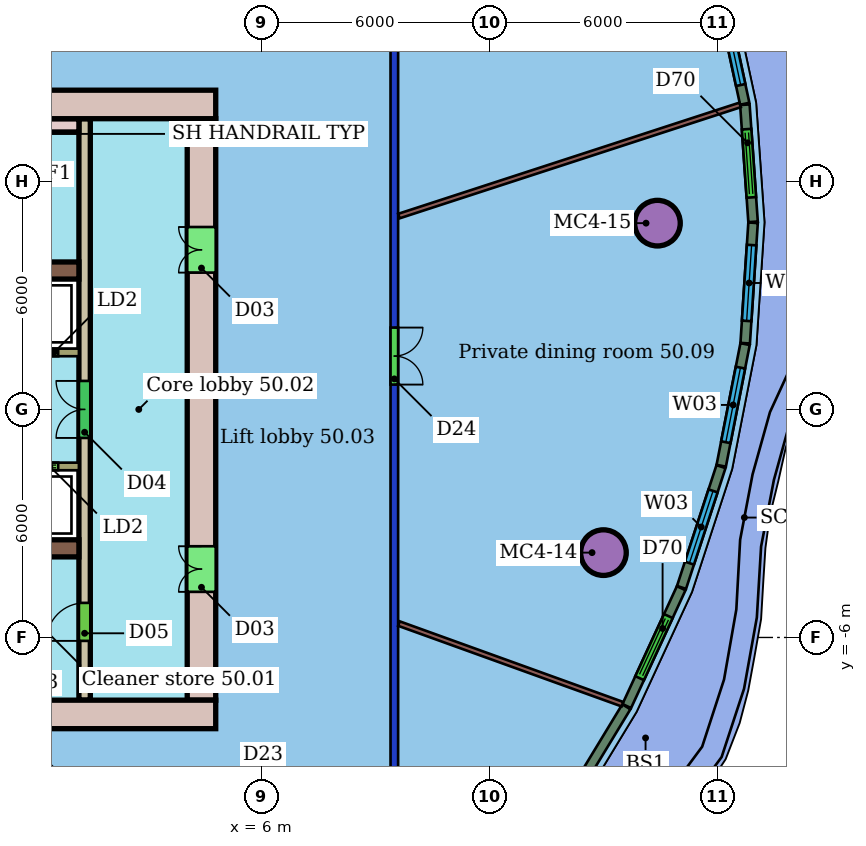
"""IFC4 building model, lengths in metres.
Left out: names, types, materials, properties, quantities, classifications, styles, units other than length and angle.
Written with IfcOpenShell. Run it as: python <this file> out.ifc"""

import sys

from ifc_helpers import new_model, si_unit, direction, frame, frame_2d, origin, origin_2d, place, context, subcontext, project, spatial, rectangle, hollow_circle, extrude, element, fill, save


model = new_model("IFC4")
c1 = context("Model", 3, precision=1e-05, world=origin(), true_north=direction((0.0, 1.0)))
c2 = subcontext(c1, "Body", "Model", "MODEL_VIEW")
j1 = project(units=[si_unit("LENGTHUNIT", "METRE"), si_unit("PLANEANGLEUNIT", "RADIAN")], contexts=[c1])
p1 = place(None, origin())
s1 = spatial("IfcSite", under=j1, at=p1, CompositionType="ELEMENT")
p2 = place(p1, origin())
s2 = spatial("IfcBuilding", under=s1, at=p2, CompositionType="ELEMENT")
p3 = place(p2, frame((0.0, 0.0, 206.5)))
s3 = spatial("IfcBuildingStorey", under=s2, at=p3, CompositionType="ELEMENT", Elevation=206.5)
for number, where, z_axis, x_axis in (
    (1, (15.003, -3.768, 0.0), (0.0, 0.0, 1.0), (1.0, 0.0, 0.0)),
    (2, (16.424, 4.901, 0.0), (0.0, 0.0, 1.0), (1.0, 0.0, 0.0)),
):
    element("IfcColumn", number, at=place(p3, frame(where, z_axis=z_axis, x_axis=x_axis)), inside=s3, PredefinedType="COLUMN", context=c2, shape_type="SweptSolid", body=[
        extrude(hollow_circle(Radius=0.6, WallThickness=0.045, at=origin_2d()), origin(), (0.0, 0.0, 1.0), 3.45),
    ])
p4 = place(p3, frame((9.5, 10.4, 0.0), z_axis=(0.0, 0.0, 1.0), x_axis=(0.0, -1.0, 0.0)))
e3 = element("IfcWall", 3, at=p4, inside=s3, PredefinedType="PARTITIONING", context=c2, shape_type="SweptSolid", body=[
    extrude(rectangle(XDim=20.8, YDim=0.2, at=frame_2d((10.4, 0.0))), origin(), (0.0, 0.0, 1.0), 3.05),
])
p5 = place(p4, frame((8.246, 0.0, 0.0)))
e4 = element("IfcOpeningElement", 4, at=p5, cuts=e3, PredefinedType="OPENING", context=c2, shape_type="SweptSolid", body=[
    extrude(rectangle(XDim=1.5, YDim=2.1, at=frame_2d((0.75, 1.05))), frame((0.0, 0.11, 0.0), z_axis=(0.0, -1.0, 0.0), x_axis=(1.0, 0.0, 0.0)), (0.0, 0.0, 1.0), 0.22),
])
p6 = place(p3, frame((15.501, -7.756, 0.0), z_axis=(0.0, 0.0, 1.0), x_axis=(-0.940683105583, 0.339286449583, 0.0)))
e5 = element("IfcWall", 5, at=p6, inside=s3, PredefinedType="PARTITIONING", context=c2, shape_type="SweptSolid", body=[
    extrude(rectangle(XDim=6.251, YDim=0.125, at=frame_2d((3.125, 0.0))), origin(), (0.0, 0.0, 1.0), 3.45),
])
p7 = place(p3, frame((18.599, 8.013, 0.0), z_axis=(0.0, 0.0, 1.0), x_axis=(-0.950829834715, -0.30971377983, 0.0)))
e6 = element("IfcWall", 6, at=p7, inside=s3, PredefinedType="PARTITIONING", context=c2, shape_type="SweptSolid", body=[
    extrude(rectangle(XDim=9.444, YDim=0.125, at=frame_2d((4.722, 0.0))), origin(), (0.0, 0.0, 1.0), 3.45),
])
p8 = place(p3, frame((13.827, -10.755, 0.0), z_axis=(0.0, 0.0, 1.0), x_axis=(0.518887081606, 0.854842790542, 0.0)))
e7 = element("IfcWall", 7, at=p8, inside=s3, PredefinedType="SOLIDWALL", context=c2, shape_type="SweptSolid", body=[
    extrude(rectangle(XDim=3.429, YDim=0.25, at=frame_2d((1.714, 0.0))), origin(), (0.0, 0.0, 1.0), 3.1),
])
p9 = place(p3, frame((15.616, -7.804, 0.0), z_axis=(0.0, 0.0, 1.0), x_axis=(0.419438897157, 0.907783570876, 0.0)))
e8 = element("IfcWall", 8, at=p9, inside=s3, PredefinedType="SOLIDWALL", context=c2, shape_type="SweptSolid", body=[
    extrude(rectangle(XDim=3.416, YDim=0.25, at=frame_2d((1.708, 0.0))), origin(), (0.0, 0.0, 1.0), 3.1),
])
p10 = place(p9, frame((0.808, 0.0, 0.0)))
e9 = element("IfcOpeningElement", 9, at=p10, cuts=e8, PredefinedType="OPENING", context=c2, shape_type="SweptSolid", body=[
    extrude(rectangle(XDim=1.8, YDim=2.4, at=frame_2d((0.9, 1.2))), frame((0.0, 0.135, 0.0), z_axis=(0.0, -1.0, 0.0), x_axis=(1.0, 0.0, 0.0)), (0.0, 0.0, 1.0), 0.27),
])
p11 = place(p3, frame((17.057, -4.683, 0.0), z_axis=(0.0, 0.0, 1.0), x_axis=(0.310658941467, 0.950521447463, 0.0)))
e10 = element("IfcWall", 10, at=p11, inside=s3, PredefinedType="SOLIDWALL", context=c2, shape_type="SweptSolid", body=[
    extrude(rectangle(XDim=3.344, YDim=0.25, at=frame_2d((1.672, 0.0))), origin(), (0.0, 0.0, 1.0), 3.1),
])
p12 = place(p11, frame((0.672, 0.0, 0.9)))
e11 = element("IfcOpeningElement", 11, at=p12, cuts=e10, PredefinedType="OPENING", context=c2, shape_type="SweptSolid", body=[
    extrude(rectangle(XDim=2.0, YDim=2.1, at=frame_2d((1.0, 1.05))), frame((0.0, 0.135, 0.0), z_axis=(0.0, -1.0, 0.0), x_axis=(1.0, 0.0, 0.0)), (0.0, 0.0, 1.0), 0.27),
])
p13 = place(p3, frame((18.102, -1.482, 0.0), z_axis=(0.0, 0.0, 1.0), x_axis=(0.192487942272, 0.981299338673, 0.0)))
e12 = element("IfcWall", 12, at=p13, inside=s3, PredefinedType="SOLIDWALL", context=c2, shape_type="SweptSolid", body=[
    extrude(rectangle(XDim=3.262, YDim=0.25, at=frame_2d((1.631, 0.0))), origin(), (0.0, 0.0, 1.0), 3.1),
])
p14 = place(p13, frame((0.631, 0.0, 0.9)))
e13 = element("IfcOpeningElement", 13, at=p14, cuts=e12, PredefinedType="OPENING", context=c2, shape_type="SweptSolid", body=[
    extrude(rectangle(XDim=2.0, YDim=2.1, at=frame_2d((1.0, 1.05))), frame((0.0, 0.135, 0.0), z_axis=(0.0, -1.0, 0.0), x_axis=(1.0, 0.0, 0.0)), (0.0, 0.0, 1.0), 0.27),
])
p15 = place(p3, frame((18.733, 1.743, 0.0), z_axis=(0.0, 0.0, 1.0), x_axis=(0.065278866851, 0.997867060055, 0.0)))
e14 = element("IfcWall", 14, at=p15, inside=s3, PredefinedType="SOLIDWALL", context=c2, shape_type="SweptSolid", body=[
    extrude(rectangle(XDim=3.175, YDim=0.25, at=frame_2d((1.588, 0.0))), origin(), (0.0, 0.0, 1.0), 3.1),
])
p16 = place(p15, frame((0.588, 0.0, 0.9)))
e15 = element("IfcOpeningElement", 15, at=p16, cuts=e14, PredefinedType="OPENING", context=c2, shape_type="SweptSolid", body=[
    extrude(rectangle(XDim=2.0, YDim=2.1, at=frame_2d((1.0, 1.05))), frame((0.0, 0.135, 0.0), z_axis=(0.0, -1.0, 0.0), x_axis=(1.0, 0.0, 0.0)), (0.0, 0.0, 1.0), 0.27),
])
p17 = place(p3, frame((18.94, 4.936, 0.0), z_axis=(0.0, 0.0, 1.0), x_axis=(-0.06987632373, 0.997555662298, 0.0)))
e16 = element("IfcWall", 16, at=p17, inside=s3, PredefinedType="SOLIDWALL", context=c2, shape_type="SweptSolid", body=[
    extrude(rectangle(XDim=3.089, YDim=0.25, at=frame_2d((1.544, 0.0))), origin(), (0.0, 0.0, 1.0), 3.1),
])
p18 = place(p17, frame((0.644, 0.0, 0.0)))
e17 = element("IfcOpeningElement", 17, at=p18, cuts=e16, PredefinedType="OPENING", context=c2, shape_type="SweptSolid", body=[
    extrude(rectangle(XDim=1.8, YDim=2.4, at=frame_2d((0.9, 1.2))), frame((0.0, 0.135, 0.0), z_axis=(0.0, -1.0, 0.0), x_axis=(1.0, 0.0, 0.0)), (0.0, 0.0, 1.0), 0.27),
])
p19 = place(p3, frame((18.72, 8.043, 0.0), z_axis=(0.0, 0.0, 1.0), x_axis=(-0.210637196003, 0.977564305639, 0.0)))
e18 = element("IfcWall", 18, at=p19, inside=s3, PredefinedType="SOLIDWALL", context=c2, shape_type="SweptSolid", body=[
    extrude(rectangle(XDim=3.009, YDim=0.25, at=frame_2d((1.504, 0.0))), origin(), (0.0, 0.0, 1.0), 3.1),
])
p20 = place(p19, frame((0.504, 0.0, 0.9)))
e19 = element("IfcOpeningElement", 19, at=p20, cuts=e18, PredefinedType="OPENING", context=c2, shape_type="SweptSolid", body=[
    extrude(rectangle(XDim=2.0, YDim=2.1, at=frame_2d((1.0, 1.05))), frame((0.0, 0.135, 0.0), z_axis=(0.0, -1.0, 0.0), x_axis=(1.0, 0.0, 0.0)), (0.0, 0.0, 1.0), 0.27),
])
p21 = place(p3, frame((4.8, 8.025, 0.0), z_axis=(0.0, 0.0, 1.0), x_axis=(-1.0, 0.0, 0.0)))
e20 = element("IfcWall", 20, at=p21, inside=s3, PredefinedType="SHEAR", context=c2, shape_type="SweptSolid", body=[
    extrude(rectangle(XDim=10.8, YDim=0.75, at=frame_2d((5.4, 0.0))), origin(), (0.0, 0.0, 1.0), 3.3),
])
p22 = place(p21, frame((4.4, 0.0, 0.0)))
e21 = element("IfcOpeningElement", 21, at=p22, cuts=e20, PredefinedType="OPENING", context=c2, shape_type="SweptSolid", body=[
    extrude(rectangle(XDim=1.2, YDim=2.1, at=frame_2d((0.6, 1.05))), frame((0.0, 0.385, 0.0), z_axis=(0.0, -1.0, 0.0), x_axis=(1.0, 0.0, 0.0)), (0.0, 0.0, 1.0), 0.77),
])
p23 = place(p3, frame((-16.8, -8.025, 0.0), z_axis=(0.0, 0.0, 1.0), x_axis=(1.0, 0.0, 0.0)))
e22 = element("IfcWall", 22, at=p23, inside=s3, PredefinedType="SHEAR", context=c2, shape_type="SweptSolid", body=[
    extrude(rectangle(XDim=21.6, YDim=0.75, at=frame_2d((10.8, 0.0))), origin(), (0.0, 0.0, 1.0), 3.3),
])
p24 = place(p23, frame((4.8, 0.0, 0.0)))
e23 = element("IfcOpeningElement", 23, at=p24, cuts=e22, PredefinedType="OPENING", context=c2, shape_type="SweptSolid", body=[
    extrude(rectangle(XDim=1.2, YDim=2.1, at=frame_2d((0.6, 1.05))), frame((0.0, 0.385, 0.0), z_axis=(0.0, -1.0, 0.0), x_axis=(1.0, 0.0, 0.0)), (0.0, 0.0, 1.0), 0.77),
])
p25 = place(p3, frame((4.425, -7.65, 0.0), z_axis=(0.0, 0.0, 1.0), x_axis=(0.0, 1.0, 0.0)))
e24 = element("IfcWall", 24, at=p25, inside=s3, PredefinedType="SHEAR", context=c2, shape_type="SweptSolid", body=[
    extrude(rectangle(XDim=15.3, YDim=0.75, at=frame_2d((7.65, 0.0))), origin(), (0.0, 0.0, 1.0), 3.3),
])
p26 = place(p25, frame((2.85, 0.0, 0.0)))
e25 = element("IfcOpeningElement", 25, at=p26, cuts=e24, PredefinedType="OPENING", context=c2, shape_type="SweptSolid", body=[
    extrude(rectangle(XDim=1.2, YDim=2.1, at=frame_2d((0.6, 1.05))), frame((0.0, 0.385, 0.0), z_axis=(0.0, -1.0, 0.0), x_axis=(1.0, 0.0, 0.0)), (0.0, 0.0, 1.0), 0.77),
])
p27 = place(p25, frame((11.25, 0.0, 0.0)))
e26 = element("IfcOpeningElement", 26, at=p27, cuts=e24, PredefinedType="OPENING", context=c2, shape_type="SweptSolid", body=[
    extrude(rectangle(XDim=1.2, YDim=2.1, at=frame_2d((0.6, 1.05))), frame((0.0, 0.385, 0.0), z_axis=(0.0, -1.0, 0.0), x_axis=(1.0, 0.0, 0.0)), (0.0, 0.0, 1.0), 0.77),
])
for number, where, z_axis, x_axis in (
    (27, (-6.0, 3.655, 0.0), (0.0, 0.0, 1.0), (1.0, 0.0, 0.0)),
    (28, (-6.0, -3.655, 0.0), (0.0, 0.0, 1.0), (1.0, 0.0, 0.0)),
):
    element("IfcWall", number, at=place(p3, frame(where, z_axis=z_axis, x_axis=x_axis)), inside=s3, PredefinedType="SHEAR", context=c2, shape_type="SweptSolid", body=[
        extrude(rectangle(XDim=7.2, YDim=0.45, at=frame_2d((3.6, 0.0))), origin(), (0.0, 0.0, 1.0), 3.3),
    ])
p28 = place(p3, frame((1.35, -7.65, 0.0), z_axis=(0.0, 0.0, 1.0), x_axis=(0.0, 1.0, 0.0)))
e29 = element("IfcWall", 29, at=p28, inside=s3, PredefinedType="SHEAR", context=c2, shape_type="SweptSolid", body=[
    extrude(rectangle(XDim=15.3, YDim=0.3, at=frame_2d((7.65, 0.0))), origin(), (0.0, 0.0, 1.0), 3.3),
])
p29 = place(p28, frame((1.56, 0.0, 0.0)))
e30 = element("IfcOpeningElement", 30, at=p29, cuts=e29, PredefinedType="OPENING", context=c2, shape_type="SweptSolid", body=[
    extrude(rectangle(XDim=1.0, YDim=2.1, at=frame_2d((0.5, 1.05))), frame((0.0, 0.16, 0.0), z_axis=(0.0, -1.0, 0.0), x_axis=(1.0, 0.0, 0.0)), (0.0, 0.0, 1.0), 0.32),
])
p30 = place(p28, frame((6.9, 0.0, 0.0)))
e31 = element("IfcOpeningElement", 31, at=p30, cuts=e29, PredefinedType="OPENING", context=c2, shape_type="SweptSolid", body=[
    extrude(rectangle(XDim=1.5, YDim=2.1, at=frame_2d((0.75, 1.05))), frame((0.0, 0.16, 0.0), z_axis=(0.0, -1.0, 0.0), x_axis=(1.0, 0.0, 0.0)), (0.0, 0.0, 1.0), 0.32),
])
p31 = place(p3, frame((-13.2, 1.5, 0.0), z_axis=(0.0, 0.0, 1.0), x_axis=(1.0, 0.0, 0.0)))
e32 = element("IfcWall", 32, at=p31, inside=s3, PredefinedType="SHEAR", context=c2, shape_type="SweptSolid", body=[
    extrude(rectangle(XDim=14.4, YDim=0.2, at=frame_2d((7.2, 0.0))), origin(), (0.0, 0.0, 1.0), 3.3),
])
p32 = place(p31, frame((10.312, 0.0, 0.0)))
e33 = element("IfcOpeningElement", 33, at=p32, cuts=e32, PredefinedType="OPENING", context=c2, shape_type="SweptSolid", body=[
    extrude(rectangle(XDim=1.1, YDim=2.1, at=frame_2d((0.55, 1.05))), frame((0.0, 0.11, 0.0), z_axis=(0.0, -1.0, 0.0), x_axis=(1.0, 0.0, 0.0)), (0.0, 0.0, 1.0), 0.22),
])
p33 = place(p31, frame((12.754, 0.0, 0.0)))
e34 = element("IfcOpeningElement", 34, at=p33, cuts=e32, PredefinedType="OPENING", context=c2, shape_type="SweptSolid", body=[
    extrude(rectangle(XDim=1.1, YDim=2.1, at=frame_2d((0.55, 1.05))), frame((0.0, 0.11, 0.0), z_axis=(0.0, -1.0, 0.0), x_axis=(1.0, 0.0, 0.0)), (0.0, 0.0, 1.0), 0.22),
])
p34 = place(p31, frame((0.15, 0.0, 0.0)))
e35 = element("IfcOpeningElement", 35, at=p34, cuts=e32, PredefinedType="OPENING", context=c2, shape_type="SweptSolid", body=[
    extrude(rectangle(XDim=0.9, YDim=2.1, at=frame_2d((0.45, 1.05))), frame((0.0, 0.11, 0.0), z_axis=(0.0, -1.0, 0.0), x_axis=(1.0, 0.0, 0.0)), (0.0, 0.0, 1.0), 0.22),
])
p35 = place(p31, frame((4.983, 0.0, 0.0)))
e36 = element("IfcOpeningElement", 36, at=p35, cuts=e32, PredefinedType="OPENING", context=c2, shape_type="SweptSolid", body=[
    extrude(rectangle(XDim=0.9, YDim=2.1, at=frame_2d((0.45, 1.05))), frame((0.0, 0.11, 0.0), z_axis=(0.0, -1.0, 0.0), x_axis=(1.0, 0.0, 0.0)), (0.0, 0.0, 1.0), 0.22),
])
p36 = place(p3, frame((1.2, -1.5, 0.0), z_axis=(0.0, 0.0, 1.0), x_axis=(-1.0, 0.0, 0.0)))
e37 = element("IfcWall", 37, at=p36, inside=s3, PredefinedType="SHEAR", context=c2, shape_type="SweptSolid", body=[
    extrude(rectangle(XDim=14.4, YDim=0.2, at=frame_2d((7.2, 0.0))), origin(), (0.0, 0.0, 1.0), 3.3),
])
p37 = place(p36, frame((7.821, 0.0, 0.0)))
e38 = element("IfcOpeningElement", 38, at=p37, cuts=e37, PredefinedType="OPENING", context=c2, shape_type="SweptSolid", body=[
    extrude(rectangle(XDim=1.2, YDim=2.1, at=frame_2d((0.6, 1.05))), frame((0.0, 0.11, 0.0), z_axis=(0.0, -1.0, 0.0), x_axis=(1.0, 0.0, 0.0)), (0.0, 0.0, 1.0), 0.22),
])
p38 = place(p36, frame((0.546, 0.0, 0.0)))
e39 = element("IfcOpeningElement", 39, at=p38, cuts=e37, PredefinedType="OPENING", context=c2, shape_type="SweptSolid", body=[
    extrude(rectangle(XDim=1.1, YDim=2.1, at=frame_2d((0.55, 1.05))), frame((0.0, 0.11, 0.0), z_axis=(0.0, -1.0, 0.0), x_axis=(1.0, 0.0, 0.0)), (0.0, 0.0, 1.0), 0.22),
])
p39 = place(p36, frame((4.983, 0.0, 0.0)))
e40 = element("IfcOpeningElement", 40, at=p39, cuts=e37, PredefinedType="OPENING", context=c2, shape_type="SweptSolid", body=[
    extrude(rectangle(XDim=1.0, YDim=2.1, at=frame_2d((0.5, 1.05))), frame((0.0, 0.11, 0.0), z_axis=(0.0, -1.0, 0.0), x_axis=(1.0, 0.0, 0.0)), (0.0, 0.0, 1.0), 0.22),
])
p40 = place(p36, frame((2.592, 0.0, 0.0)))
e41 = element("IfcOpeningElement", 41, at=p40, cuts=e37, PredefinedType="OPENING", context=c2, shape_type="SweptSolid", body=[
    extrude(rectangle(XDim=1.0, YDim=2.1, at=frame_2d((0.5, 1.05))), frame((0.0, 0.11, 0.0), z_axis=(0.0, -1.0, 0.0), x_axis=(1.0, 0.0, 0.0)), (0.0, 0.0, 1.0), 0.22),
])
p41 = place(p3, frame((0.4, 7.475, 0.0), z_axis=(0.0, 0.0, 1.0), x_axis=(1.0, 0.0, 0.0)))
e42 = element("IfcWall", 42, at=p41, inside=s3, PredefinedType="SHEAR", context=c2, shape_type="SweptSolid", body=[
    extrude(rectangle(XDim=0.8, YDim=0.35, at=frame_2d((0.4, 0.0))), origin(), (0.0, 0.0, 1.0), 3.3),
])
p42 = place(p5, origin())
e43 = element("IfcDoor", 43, at=p42, inside=s3, OperationType="DOUBLE_DOOR_SINGLE_SWING", PredefinedType="DOOR", context=c2, shape_type="SweptSolid", body=[
    extrude(rectangle(XDim=1.5, YDim=2.1, at=frame_2d((0.75, 1.05))), frame((0.0, 0.025, 0.0), z_axis=(0.0, -1.0, 0.0), x_axis=(1.0, 0.0, 0.0)), (0.0, 0.0, 1.0), 0.05),
])
fill(e4, e43)
p43 = place(p10, origin())
e44 = element("IfcDoor", 44, at=p43, inside=s3, OperationType="DOUBLE_DOOR_SLIDING", PredefinedType="DOOR", context=c2, shape_type="SweptSolid", body=[
    extrude(rectangle(XDim=1.8, YDim=2.4, at=frame_2d((0.9, 1.2))), frame((0.0, 0.025, 0.0), z_axis=(0.0, -1.0, 0.0), x_axis=(1.0, 0.0, 0.0)), (0.0, 0.0, 1.0), 0.05),
])
fill(e9, e44)
p44 = place(p12, origin())
e45 = element("IfcWindow", 45, at=p44, inside=s3, PartitioningType="SINGLE_PANEL", PredefinedType="WINDOW", context=c2, shape_type="SweptSolid", body=[
    extrude(rectangle(XDim=2.0, YDim=2.1, at=frame_2d((1.0, 1.05))), frame((0.0, 0.03, 0.0), z_axis=(0.0, -1.0, 0.0), x_axis=(1.0, 0.0, 0.0)), (0.0, 0.0, 1.0), 0.06),
])
fill(e11, e45)
p45 = place(p14, origin())
e46 = element("IfcWindow", 46, at=p45, inside=s3, PartitioningType="SINGLE_PANEL", PredefinedType="WINDOW", context=c2, shape_type="SweptSolid", body=[
    extrude(rectangle(XDim=2.0, YDim=2.1, at=frame_2d((1.0, 1.05))), frame((0.0, 0.03, 0.0), z_axis=(0.0, -1.0, 0.0), x_axis=(1.0, 0.0, 0.0)), (0.0, 0.0, 1.0), 0.06),
])
fill(e13, e46)
p46 = place(p16, origin())
e47 = element("IfcWindow", 47, at=p46, inside=s3, PartitioningType="SINGLE_PANEL", PredefinedType="WINDOW", context=c2, shape_type="SweptSolid", body=[
    extrude(rectangle(XDim=2.0, YDim=2.1, at=frame_2d((1.0, 1.05))), frame((0.0, 0.03, 0.0), z_axis=(0.0, -1.0, 0.0), x_axis=(1.0, 0.0, 0.0)), (0.0, 0.0, 1.0), 0.06),
])
fill(e15, e47)
p47 = place(p18, origin())
e48 = element("IfcDoor", 48, at=p47, inside=s3, OperationType="DOUBLE_DOOR_SLIDING", PredefinedType="DOOR", context=c2, shape_type="SweptSolid", body=[
    extrude(rectangle(XDim=1.8, YDim=2.4, at=frame_2d((0.9, 1.2))), frame((0.0, 0.025, 0.0), z_axis=(0.0, -1.0, 0.0), x_axis=(1.0, 0.0, 0.0)), (0.0, 0.0, 1.0), 0.05),
])
fill(e17, e48)
p48 = place(p20, origin())
e49 = element("IfcWindow", 49, at=p48, inside=s3, PartitioningType="SINGLE_PANEL", PredefinedType="WINDOW", context=c2, shape_type="SweptSolid", body=[
    extrude(rectangle(XDim=2.0, YDim=2.1, at=frame_2d((1.0, 1.05))), frame((0.0, 0.03, 0.0), z_axis=(0.0, -1.0, 0.0), x_axis=(1.0, 0.0, 0.0)), (0.0, 0.0, 1.0), 0.06),
])
fill(e19, e49)
p49 = place(p26, origin())
e50 = element("IfcDoor", 50, at=p49, inside=s3, OperationType="DOUBLE_DOOR_SINGLE_SWING", PredefinedType="NOTDEFINED", context=c2, shape_type="SweptSolid", body=[
    extrude(rectangle(XDim=1.2, YDim=2.1, at=frame_2d((0.6, 1.05))), frame((0.0, 0.025, 0.0), z_axis=(0.0, -1.0, 0.0), x_axis=(1.0, 0.0, 0.0)), (0.0, 0.0, 1.0), 0.05),
])
fill(e25, e50)
p50 = place(p27, origin())
e51 = element("IfcDoor", 51, at=p50, inside=s3, OperationType="DOUBLE_DOOR_SINGLE_SWING", PredefinedType="NOTDEFINED", context=c2, shape_type="SweptSolid", body=[
    extrude(rectangle(XDim=1.2, YDim=2.1, at=frame_2d((0.6, 1.05))), frame((0.0, 0.025, 0.0), z_axis=(0.0, -1.0, 0.0), x_axis=(1.0, 0.0, 0.0)), (0.0, 0.0, 1.0), 0.05),
])
fill(e26, e51)
p51 = place(p29, origin())
e52 = element("IfcDoor", 52, at=p51, inside=s3, OperationType="SINGLE_SWING_LEFT", PredefinedType="NOTDEFINED", context=c2, shape_type="SweptSolid", body=[
    extrude(rectangle(XDim=1.0, YDim=2.1, at=frame_2d((0.5, 1.05))), frame((0.0, 0.025, 0.0), z_axis=(0.0, -1.0, 0.0), x_axis=(1.0, 0.0, 0.0)), (0.0, 0.0, 1.0), 0.05),
])
fill(e30, e52)
p52 = place(p30, origin())
e53 = element("IfcDoor", 53, at=p52, inside=s3, OperationType="DOUBLE_DOOR_SINGLE_SWING", PredefinedType="NOTDEFINED", context=c2, shape_type="SweptSolid", body=[
    extrude(rectangle(XDim=1.5, YDim=2.1, at=frame_2d((0.75, 1.05))), frame((0.0, 0.025, 0.0), z_axis=(0.0, -1.0, 0.0), x_axis=(1.0, 0.0, 0.0)), (0.0, 0.0, 1.0), 0.05),
])
fill(e31, e53)
p53 = place(p33, origin())
e54 = element("IfcDoor", 54, at=p53, inside=s3, OperationType="DOUBLE_DOOR_SLIDING", PredefinedType="NOTDEFINED", context=c2, shape_type="SweptSolid", body=[
    extrude(rectangle(XDim=1.1, YDim=2.1, at=frame_2d((0.55, 1.05))), frame((0.0, 0.025, 0.0), z_axis=(0.0, -1.0, 0.0), x_axis=(1.0, 0.0, 0.0)), (0.0, 0.0, 1.0), 0.05),
])
fill(e34, e54)
p54 = place(p38, origin())
e55 = element("IfcDoor", 55, at=p54, inside=s3, OperationType="DOUBLE_DOOR_SLIDING", PredefinedType="NOTDEFINED", context=c2, shape_type="SweptSolid", body=[
    extrude(rectangle(XDim=1.1, YDim=2.1, at=frame_2d((0.55, 1.05))), frame((0.0, 0.025, 0.0), z_axis=(0.0, -1.0, 0.0), x_axis=(1.0, 0.0, 0.0)), (0.0, 0.0, 1.0), 0.05),
])
fill(e39, e55)
save(model, sys.argv[1])
